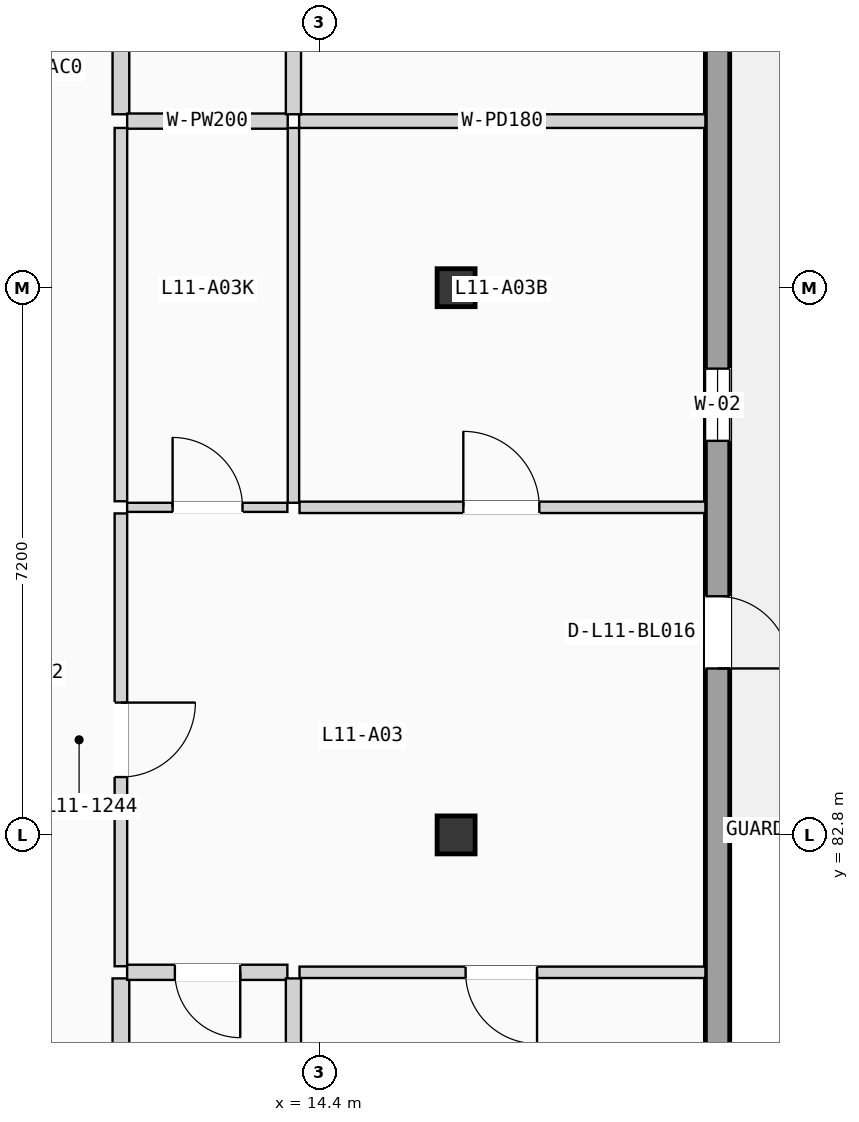
"""IFC4 building model, lengths in metres.
Left out: names, types, materials, properties, quantities, classifications, styles, units other than length and angle.
Written with IfcOpenShell. Run it as: python <this file> out.ifc"""

import sys

from ifc_helpers import new_model, si_unit, direction, frame, frame_2d, origin, origin_2d, place, context, subcontext, project, spatial, rectangle, extrude, element, fill, save


model = new_model("IFC4")
c1 = context("Model", 3, precision=1e-05, world=origin(), true_north=direction((0.0, 1.0)))
c2 = subcontext(c1, "Body", "Model", "MODEL_VIEW")
j1 = project(units=[si_unit("LENGTHUNIT", "METRE"), si_unit("PLANEANGLEUNIT", "RADIAN")], contexts=[c1])
p1 = place(None, origin())
s1 = spatial("IfcSite", under=j1, at=p1, CompositionType="ELEMENT")
p2 = place(p1, origin())
s2 = spatial("IfcBuilding", under=s1, at=p2, CompositionType="ELEMENT")
p3 = place(p2, frame((0.0, 0.0, 37.275)))
s3 = spatial("IfcBuildingStorey", under=s2, at=p3, CompositionType="ELEMENT", Elevation=37.275)
for number, where, z_axis, x_axis in (
    (1, (16.2, 82.8, 0.0), (0.0, 0.0, 1.0), (1.0, 0.0, 0.0)),
    (2, (16.2, 90.0, 0.0), (0.0, 0.0, 1.0), (1.0, 0.0, 0.0)),
):
    element("IfcColumn", number, at=place(p3, frame(where, z_axis=z_axis, x_axis=x_axis)), inside=s3, PredefinedType="COLUMN", context=c2, shape_type="SweptSolid", body=[
        extrude(rectangle(XDim=0.5, YDim=0.5, at=origin_2d()), origin(), (0.0, 0.0, 1.0), 3.15),
    ])
p4 = place(p3, frame((19.64, 68.72, 0.0), z_axis=(0.0, 0.0, 1.0), x_axis=(0.0, 1.0, 0.0)))
e3 = element("IfcWall", 3, at=p4, inside=s3, PredefinedType="SOLIDWALL", context=c2, shape_type="SweptSolid", body=[
    extrude(rectangle(XDim=49.76, YDim=0.32, at=frame_2d((24.88, 0.0))), origin(), (0.0, 0.0, 1.0), 2.9),
])
p5 = place(p4, frame((16.27, 0.0, 0.0)))
e4 = element("IfcOpeningElement", 4, at=p5, cuts=e3, PredefinedType="OPENING", context=c2, shape_type="SweptSolid", body=[
    extrude(rectangle(XDim=0.95, YDim=2.15, at=frame_2d((0.475, 1.075))), frame((0.0, 0.17, 0.0), z_axis=(0.0, -1.0, 0.0), x_axis=(1.0, 0.0, 0.0)), (0.0, 0.0, 1.0), 0.34),
])
p6 = place(p4, frame((9.261, 0.0, 0.9)))
e5 = element("IfcOpeningElement", 5, at=p6, cuts=e3, PredefinedType="OPENING", context=c2, shape_type="SweptSolid", body=[
    extrude(rectangle(XDim=0.95, YDim=1.2, at=frame_2d((0.475, 0.6))), frame((0.0, 0.17, 0.0), z_axis=(0.0, -1.0, 0.0), x_axis=(1.0, 0.0, 0.0)), (0.0, 0.0, 1.0), 0.34),
])
p7 = place(p4, frame((19.265, 0.0, 0.865)))
e6 = element("IfcOpeningElement", 6, at=p7, cuts=e3, PredefinedType="OPENING", context=c2, shape_type="SweptSolid", body=[
    extrude(rectangle(XDim=0.95, YDim=1.35, at=frame_2d((0.475, 0.675))), frame((0.0, 0.17, 0.0), z_axis=(0.0, -1.0, 0.0), x_axis=(1.0, 0.0, 0.0)), (0.0, 0.0, 1.0), 0.34),
])
p8 = place(p4, frame((31.984, 0.0, 0.715)))
e7 = element("IfcOpeningElement", 7, at=p8, cuts=e3, PredefinedType="OPENING", context=c2, shape_type="SweptSolid", body=[
    extrude(rectangle(XDim=0.95, YDim=1.5, at=frame_2d((0.475, 0.75))), frame((0.0, 0.17, 0.0), z_axis=(0.0, -1.0, 0.0), x_axis=(1.0, 0.0, 0.0)), (0.0, 0.0, 1.0), 0.34),
])
p9 = place(p4, frame((25.411, 0.0, 0.565)))
e8 = element("IfcOpeningElement", 8, at=p9, cuts=e3, PredefinedType="OPENING", context=c2, shape_type="SweptSolid", body=[
    extrude(rectangle(XDim=0.95, YDim=1.65, at=frame_2d((0.475, 0.825))), frame((0.0, 0.17, 0.0), z_axis=(0.0, -1.0, 0.0), x_axis=(1.0, 0.0, 0.0)), (0.0, 0.0, 1.0), 0.34),
])
p10 = place(p4, frame((39.113, 0.0, 0.85)))
e9 = element("IfcOpeningElement", 9, at=p10, cuts=e3, PredefinedType="OPENING", context=c2, shape_type="SweptSolid", body=[
    extrude(rectangle(XDim=0.95, YDim=1.2, at=frame_2d((0.475, 0.6))), frame((0.0, 0.17, 0.0), z_axis=(0.0, -1.0, 0.0), x_axis=(1.0, 0.0, 0.0)), (0.0, 0.0, 1.0), 0.34),
])
p11 = place(p3, frame((11.79, 81.072, 0.0), z_axis=(0.0, 0.0, 1.0), x_axis=(0.0, 1.0, 0.0)))
e10 = element("IfcWall", 10, at=p11, inside=s3, PredefinedType="PARTITIONING", context=c2, shape_type="SweptSolid", body=[
    extrude(rectangle(XDim=5.958, YDim=0.165, at=frame_2d((2.979, 0.0))), origin(), (0.0, 0.0, 1.0), 2.87),
])
p12 = place(p11, frame((2.489, 0.0, 0.0)))
e11 = element("IfcOpeningElement", 11, at=p12, cuts=e10, PredefinedType="OPENING", context=c2, shape_type="SweptSolid", body=[
    extrude(rectangle(XDim=0.98, YDim=2.08, at=frame_2d((0.49, 1.04))), frame((0.0, 0.093, 0.0), z_axis=(0.0, -1.0, 0.0), x_axis=(1.0, 0.0, 0.0)), (0.0, 0.0, 1.0), 0.185),
])
p13 = place(p3, frame((11.79, 75.975, 0.0), z_axis=(0.0, 0.0, 1.0), x_axis=(0.0, 1.0, 0.0)))
e12 = element("IfcWall", 12, at=p13, inside=s3, PredefinedType="PLUMBINGWALL", context=c2, shape_type="SweptSolid", body=[
    extrude(rectangle(XDim=4.937, YDim=0.22, at=frame_2d((2.469, 0.0))), origin(), (0.0, 0.0, 1.0), 2.87),
])
p14 = place(p3, frame((11.79, 87.19, 0.0), z_axis=(0.0, 0.0, 1.0), x_axis=(0.0, 1.0, 0.0)))
e13 = element("IfcWall", 13, at=p14, inside=s3, PredefinedType="PARTITIONING", context=c2, shape_type="SweptSolid", body=[
    extrude(rectangle(XDim=4.912, YDim=0.165, at=frame_2d((2.456, 0.0))), origin(), (0.0, 0.0, 1.0), 2.87),
])
p15 = place(p3, frame((11.79, 92.282, 0.0), z_axis=(0.0, 0.0, 1.0), x_axis=(0.0, 1.0, 0.0)))
e14 = element("IfcWall", 14, at=p15, inside=s3, PredefinedType="PLUMBINGWALL", context=c2, shape_type="SweptSolid", body=[
    extrude(rectangle(XDim=5.785, YDim=0.22, at=frame_2d((2.893, 0.0))), origin(), (0.0, 0.0, 1.0), 2.87),
])
p16 = place(p3, frame((11.872, 80.992, 0.0), z_axis=(0.0, 0.0, 1.0), x_axis=(1.0, 0.0, 0.0)))
e15 = element("IfcWall", 15, at=p16, inside=s3, PredefinedType="PLUMBINGWALL", context=c2, shape_type="SweptSolid", body=[
    extrude(rectangle(XDim=2.108, YDim=0.2, at=frame_2d((1.054, 0.0))), origin(), (0.0, 0.0, 1.0), 2.87),
])
p17 = place(p16, frame((0.628, 0.0, 0.0)))
e16 = element("IfcOpeningElement", 16, at=p17, cuts=e15, PredefinedType="OPENING", context=c2, shape_type="SweptSolid", body=[
    extrude(rectangle(XDim=0.86, YDim=2.0, at=frame_2d((0.43, 1.0))), frame((0.0, 0.11, 0.0), z_axis=(0.0, -1.0, 0.0), x_axis=(1.0, 0.0, 0.0)), (0.0, 0.0, 1.0), 0.22),
])
p18 = place(p3, frame((11.872, 87.11, 0.0), z_axis=(0.0, 0.0, 1.0), x_axis=(1.0, 0.0, 0.0)))
e17 = element("IfcWall", 17, at=p18, inside=s3, PredefinedType="PARTITIONING", context=c2, shape_type="SweptSolid", body=[
    extrude(rectangle(XDim=2.108, YDim=0.12, at=frame_2d((1.054, 0.0))), origin(), (0.0, 0.0, 1.0), 2.87),
])
p19 = place(p18, frame((0.598, 0.0, 0.0)))
e18 = element("IfcOpeningElement", 18, at=p19, cuts=e17, PredefinedType="OPENING", context=c2, shape_type="SweptSolid", body=[
    extrude(rectangle(XDim=0.92, YDim=2.02, at=frame_2d((0.46, 1.01))), frame((0.0, 0.07, 0.0), z_axis=(0.0, -1.0, 0.0), x_axis=(1.0, 0.0, 0.0)), (0.0, 0.0, 1.0), 0.14),
])
p20 = place(p3, frame((14.14, 80.992, 0.0), z_axis=(0.0, 0.0, 1.0), x_axis=(1.0, 0.0, 0.0)))
e19 = element("IfcWall", 19, at=p20, inside=s3, PredefinedType="PARTITIONING", context=c2, shape_type="SweptSolid", body=[
    extrude(rectangle(XDim=5.34, YDim=0.15, at=frame_2d((2.67, 0.0))), origin(), (0.0, 0.0, 1.0), 2.87),
])
p21 = place(p20, frame((2.185, 0.0, 0.0)))
e20 = element("IfcOpeningElement", 20, at=p21, cuts=e19, PredefinedType="OPENING", context=c2, shape_type="SweptSolid", body=[
    extrude(rectangle(XDim=0.94, YDim=2.06, at=frame_2d((0.47, 1.03))), frame((0.0, 0.085, 0.0), z_axis=(0.0, -1.0, 0.0), x_axis=(1.0, 0.0, 0.0)), (0.0, 0.0, 1.0), 0.17),
])
p22 = place(p3, frame((14.14, 87.11, 0.0), z_axis=(0.0, 0.0, 1.0), x_axis=(1.0, 0.0, 0.0)))
e21 = element("IfcWall", 21, at=p22, inside=s3, PredefinedType="PARTITIONING", context=c2, shape_type="SweptSolid", body=[
    extrude(rectangle(XDim=5.34, YDim=0.15, at=frame_2d((2.67, 0.0))), origin(), (0.0, 0.0, 1.0), 2.87),
])
p23 = place(p22, frame((2.155, 0.0, 0.0)))
e22 = element("IfcOpeningElement", 22, at=p23, cuts=e21, PredefinedType="OPENING", context=c2, shape_type="SweptSolid", body=[
    extrude(rectangle(XDim=1.0, YDim=2.06, at=frame_2d((0.5, 1.03))), frame((0.0, 0.085, 0.0), z_axis=(0.0, -1.0, 0.0), x_axis=(1.0, 0.0, 0.0)), (0.0, 0.0, 1.0), 0.17),
])
p24 = place(p3, frame((14.06, 75.975, 0.0), z_axis=(0.0, 0.0, 1.0), x_axis=(0.0, 1.0, 0.0)))
e23 = element("IfcWall", 23, at=p24, inside=s3, PredefinedType="PLUMBINGWALL", context=c2, shape_type="SweptSolid", body=[
    extrude(rectangle(XDim=4.937, YDim=0.2, at=frame_2d((2.469, 0.0))), origin(), (0.0, 0.0, 1.0), 2.87),
])
p25 = place(p3, frame((14.06, 87.17, 0.0), z_axis=(0.0, 0.0, 1.0), x_axis=(0.0, 1.0, 0.0)))
e24 = element("IfcWall", 24, at=p25, inside=s3, PredefinedType="PARTITIONING", context=c2, shape_type="SweptSolid", body=[
    extrude(rectangle(XDim=4.932, YDim=0.15, at=frame_2d((2.466, 0.0))), origin(), (0.0, 0.0, 1.0), 2.87),
])
p26 = place(p3, frame((11.872, 92.192, 0.0), z_axis=(0.0, 0.0, 1.0), x_axis=(1.0, 0.0, 0.0)))
e25 = element("IfcWall", 25, at=p26, inside=s3, PredefinedType="PLUMBINGWALL", context=c2, shape_type="SweptSolid", body=[
    extrude(rectangle(XDim=2.113, YDim=0.2, at=frame_2d((1.057, 0.0))), origin(), (0.0, 0.0, 1.0), 2.87),
])
p27 = place(p3, frame((14.135, 92.192, 0.0), z_axis=(0.0, 0.0, 1.0), x_axis=(1.0, 0.0, 0.0)))
e26 = element("IfcWall", 26, at=p27, inside=s3, PredefinedType="PARTITIONING", context=c2, shape_type="SweptSolid", body=[
    extrude(rectangle(XDim=5.345, YDim=0.18, at=frame_2d((2.672, 0.0))), origin(), (0.0, 0.0, 1.0), 2.87),
])
p28 = place(p3, frame((14.06, 92.282, 0.0), z_axis=(0.0, 0.0, 1.0), x_axis=(0.0, 1.0, 0.0)))
e27 = element("IfcWall", 27, at=p28, inside=s3, PredefinedType="PLUMBINGWALL", context=c2, shape_type="SweptSolid", body=[
    extrude(rectangle(XDim=5.79, YDim=0.2, at=frame_2d((2.895, 0.0))), origin(), (0.0, 0.0, 1.0), 2.87),
])
p29 = place(p5, frame((0.95, 0.0, 0.0), z_axis=(0.0, 0.0, 1.0), x_axis=(-1.0, 0.0, 0.0)))
e28 = element("IfcDoor", 28, at=p29, inside=s3, OperationType="SINGLE_SWING_LEFT", PredefinedType="DOOR", context=c2, shape_type="SweptSolid", body=[
    extrude(rectangle(XDim=0.95, YDim=2.15, at=frame_2d((0.475, 1.075))), frame((0.0, 0.025, 0.0), z_axis=(0.0, -1.0, 0.0), x_axis=(1.0, 0.0, 0.0)), (0.0, 0.0, 1.0), 0.05),
])
fill(e4, e28)
p30 = place(p7, origin())
e29 = element("IfcWindow", 29, at=p30, inside=s3, PartitioningType="SINGLE_PANEL", PredefinedType="WINDOW", context=c2, shape_type="SweptSolid", body=[
    extrude(rectangle(XDim=0.95, YDim=1.35, at=frame_2d((0.475, 0.675))), frame((0.0, 0.03, 0.0), z_axis=(0.0, -1.0, 0.0), x_axis=(1.0, 0.0, 0.0)), (0.0, 0.0, 1.0), 0.06),
])
fill(e6, e29)
p31 = place(p12, frame((0.98, 0.0, 0.0), z_axis=(0.0, 0.0, 1.0), x_axis=(-1.0, 0.0, 0.0)))
e30 = element("IfcDoor", 30, at=p31, inside=s3, OperationType="SINGLE_SWING_RIGHT", PredefinedType="DOOR", context=c2, shape_type="SweptSolid", body=[
    extrude(rectangle(XDim=0.98, YDim=2.08, at=frame_2d((0.49, 1.04))), frame((0.0, 0.025, 0.0), z_axis=(0.0, -1.0, 0.0), x_axis=(1.0, 0.0, 0.0)), (0.0, 0.0, 1.0), 0.05),
])
fill(e11, e30)
p32 = place(p17, frame((0.86, 0.0, 0.0), z_axis=(0.0, 0.0, 1.0), x_axis=(-1.0, 0.0, 0.0)))
e31 = element("IfcDoor", 31, at=p32, inside=s3, OperationType="SINGLE_SWING_RIGHT", PredefinedType="DOOR", context=c2, shape_type="SweptSolid", body=[
    extrude(rectangle(XDim=0.86, YDim=2.0, at=frame_2d((0.43, 1.0))), frame((0.0, 0.025, 0.0), z_axis=(0.0, -1.0, 0.0), x_axis=(1.0, 0.0, 0.0)), (0.0, 0.0, 1.0), 0.05),
])
fill(e16, e31)
p33 = place(p19, origin())
e32 = element("IfcDoor", 32, at=p33, inside=s3, OperationType="SINGLE_SWING_LEFT", PredefinedType="DOOR", context=c2, shape_type="SweptSolid", body=[
    extrude(rectangle(XDim=0.92, YDim=2.02, at=frame_2d((0.46, 1.01))), frame((0.0, 0.025, 0.0), z_axis=(0.0, -1.0, 0.0), x_axis=(1.0, 0.0, 0.0)), (0.0, 0.0, 1.0), 0.05),
])
fill(e18, e32)
p34 = place(p21, frame((0.94, 0.0, 0.0), z_axis=(0.0, 0.0, 1.0), x_axis=(-1.0, 0.0, 0.0)))
e33 = element("IfcDoor", 33, at=p34, inside=s3, OperationType="SINGLE_SWING_RIGHT", PredefinedType="DOOR", context=c2, shape_type="SweptSolid", body=[
    extrude(rectangle(XDim=0.94, YDim=2.06, at=frame_2d((0.47, 1.03))), frame((0.0, 0.025, 0.0), z_axis=(0.0, -1.0, 0.0), x_axis=(1.0, 0.0, 0.0)), (0.0, 0.0, 1.0), 0.05),
])
fill(e20, e33)
p35 = place(p23, origin())
e34 = element("IfcDoor", 34, at=p35, inside=s3, OperationType="SINGLE_SWING_LEFT", PredefinedType="DOOR", context=c2, shape_type="SweptSolid", body=[
    extrude(rectangle(XDim=1.0, YDim=2.06, at=frame_2d((0.5, 1.03))), frame((0.0, 0.025, 0.0), z_axis=(0.0, -1.0, 0.0), x_axis=(1.0, 0.0, 0.0)), (0.0, 0.0, 1.0), 0.05),
])
fill(e22, e34)
save(model, sys.argv[1])
